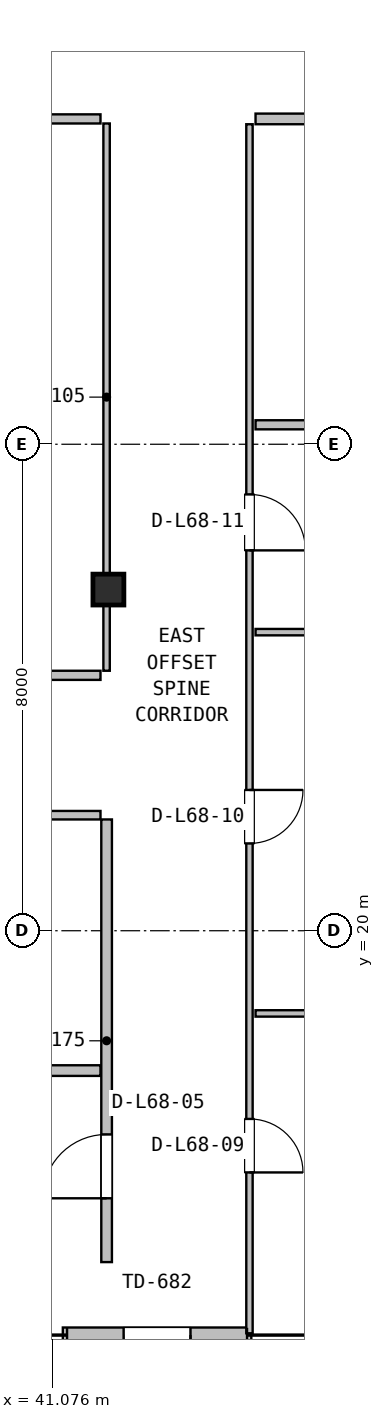
"""IFC4 building model, lengths in metres.
Left out: names, types, materials, properties, quantities, classifications, styles, units other than length and angle.
Written with IfcOpenShell. Run it as: python <this file> out.ifc"""

import sys

from ifc_helpers import new_model, si_unit, direction, frame, frame_2d, origin, origin_2d, place, context, subcontext, project, spatial, rectangle, hollow_circle, extrude, source, transform, mapped, element, fill, save


model = new_model("IFC4")
c1 = context("Model", 3, precision=1e-05, world=origin(), true_north=direction((0.0, 1.0)))
c2 = subcontext(c1, "Body", "Model", "MODEL_VIEW")
j1 = project(units=[si_unit("LENGTHUNIT", "METRE"), si_unit("PLANEANGLEUNIT", "RADIAN")], contexts=[c1])
p1 = place(None, origin())
s1 = spatial("IfcSite", under=j1, at=p1, CompositionType="ELEMENT")
p2 = place(p1, origin())
s2 = spatial("IfcBuilding", under=s1, at=p2, CompositionType="ELEMENT")
p3 = place(p2, frame((0.0, 0.0, 273.6)))
s3 = spatial("IfcBuildingStorey", under=s2, at=p3, CompositionType="ELEMENT", Elevation=273.6)
m1 = source(origin(), c2, "Body", "SweptSolid", [
    extrude(hollow_circle(Radius=0.254, WallThickness=0.02, at=origin_2d()), origin(), (0.0, 0.0, 1.0), 3.8),
])
p4 = place(p3, frame((42.0, 25.61, 0.0), z_axis=(0.0, 0.0, 1.0), x_axis=(1.0, 0.0, 0.0)))
e1 = element("IfcColumn", 1, at=p4, inside=s3, PredefinedType="COLUMN", context=c2, shape_type="MappedRepresentation", body=[
    mapped(m1, transform((0.0, 0.0, 0.0), x_axis=(1.0, 0.0, 0.0), y_axis=(0.0, 1.0, 0.0), z_axis=(0.0, 0.0, 1.0), scale=1.0)),
])
p5 = place(p3, frame((41.25, 13.35, 0.0), z_axis=(0.0, 0.0, 1.0), x_axis=(1.0, 0.0, 0.0)))
e2 = element("IfcWall", 2, at=p5, inside=s3, PredefinedType="SOLIDWALL", context=c2, shape_type="SweptSolid", body=[
    extrude(rectangle(XDim=3.1, YDim=0.25, at=frame_2d((1.55, 0.0))), origin(), (0.0, 0.0, 1.0), 3.53),
])
p6 = place(p5, frame((1.0, 0.0, 0.0)))
e3 = element("IfcOpeningElement", 3, at=p6, cuts=e2, PredefinedType="OPENING", context=c2, shape_type="SweptSolid", body=[
    extrude(rectangle(XDim=1.1, YDim=2.15, at=frame_2d((0.55, 1.075))), frame((0.0, 0.135, 0.0), z_axis=(0.0, -1.0, 0.0), x_axis=(1.0, 0.0, 0.0)), (0.0, 0.0, 1.0), 0.27),
])
p7 = place(p3, frame((41.97, 14.55, 0.0), z_axis=(0.0, 0.0, 1.0), x_axis=(0.0, 1.0, 0.0)))
e4 = element("IfcWall", 4, at=p7, inside=s3, PredefinedType="PARTITIONING", context=c2, shape_type="SweptSolid", body=[
    extrude(rectangle(XDim=7.28, YDim=0.175, at=frame_2d((3.64, 0.0))), origin(), (0.0, 0.0, 1.0), 2.981),
])
p8 = place(p7, frame((1.05, 0.0, 0.0)))
e5 = element("IfcOpeningElement", 5, at=p8, cuts=e4, PredefinedType="OPENING", context=c2, shape_type="SweptSolid", body=[
    extrude(rectangle(XDim=1.05, YDim=2.1, at=frame_2d((0.525, 1.05))), frame((0.0, 0.098, 0.0), z_axis=(0.0, -1.0, 0.0), x_axis=(1.0, 0.0, 0.0)), (0.0, 0.0, 1.0), 0.195),
])
p9 = place(p3, frame((12.18, 17.7, 0.0), z_axis=(0.0, 0.0, 1.0), x_axis=(1.0, 0.0, 0.0)))
e6 = element("IfcWall", 6, at=p9, inside=s3, PredefinedType="PARTITIONING", context=c2, shape_type="SweptSolid", body=[
    extrude(rectangle(XDim=29.69, YDim=0.175, at=frame_2d((14.845, 0.0))), origin(), (0.0, 0.0, 1.0), 2.981),
])
p10 = place(p3, frame((12.18, 21.9, 0.0), z_axis=(0.0, 0.0, 1.0), x_axis=(1.0, 0.0, 0.0)))
e7 = element("IfcWall", 7, at=p10, inside=s3, PredefinedType="PARTITIONING", context=c2, shape_type="SweptSolid", body=[
    extrude(rectangle(XDim=29.69, YDim=0.14, at=frame_2d((14.845, 0.0))), origin(), (0.0, 0.0, 1.0), 2.981),
])
p11 = place(p10, frame((16.08, 0.0, 0.0)))
e8 = element("IfcOpeningElement", 8, at=p11, cuts=e7, PredefinedType="OPENING", context=c2, shape_type="SweptSolid", body=[
    extrude(rectangle(XDim=1.0, YDim=2.1, at=frame_2d((0.5, 1.05))), frame((0.0, 0.08, 0.0), z_axis=(0.0, -1.0, 0.0), x_axis=(1.0, 0.0, 0.0)), (0.0, 0.0, 1.0), 0.16),
])
p12 = place(p3, frame((12.18, 24.2, 0.0), z_axis=(0.0, 0.0, 1.0), x_axis=(1.0, 0.0, 0.0)))
e9 = element("IfcWall", 9, at=p12, inside=s3, PredefinedType="PARTITIONING", context=c2, shape_type="SweptSolid", body=[
    extrude(rectangle(XDim=29.69, YDim=0.15, at=frame_2d((14.845, 0.0))), origin(), (0.0, 0.0, 1.0), 2.981),
])
p13 = place(p12, frame((7.96, 0.0, 0.0)))
e10 = element("IfcOpeningElement", 10, at=p13, cuts=e9, PredefinedType="OPENING", context=c2, shape_type="SweptSolid", body=[
    extrude(rectangle(XDim=0.88, YDim=2.06, at=frame_2d((0.44, 1.03))), frame((0.0, 0.085, 0.0), z_axis=(0.0, -1.0, 0.0), x_axis=(1.0, 0.0, 0.0)), (0.0, 0.0, 1.0), 0.17),
])
p14 = place(p12, frame((21.17, 0.0, 0.0)))
e11 = element("IfcOpeningElement", 11, at=p14, cuts=e9, PredefinedType="OPENING", context=c2, shape_type="SweptSolid", body=[
    extrude(rectangle(XDim=0.88, YDim=2.06, at=frame_2d((0.44, 1.03))), frame((0.0, 0.085, 0.0), z_axis=(0.0, -1.0, 0.0), x_axis=(1.0, 0.0, 0.0)), (0.0, 0.0, 1.0), 0.17),
])
p15 = place(p3, frame((12.18, 33.35, 0.0), z_axis=(0.0, 0.0, 1.0), x_axis=(1.0, 0.0, 0.0)))
e12 = element("IfcWall", 12, at=p15, inside=s3, PredefinedType="PARTITIONING", context=c2, shape_type="SweptSolid", body=[
    extrude(rectangle(XDim=29.69, YDim=0.15, at=frame_2d((14.845, 0.0))), origin(), (0.0, 0.0, 1.0), 2.981),
])
p16 = place(p3, frame((41.97, 24.275, 0.0), z_axis=(0.0, 0.0, 1.0), x_axis=(0.0, 1.0, 0.0)))
e13 = element("IfcWall", 13, at=p16, inside=s3, PredefinedType="PARTITIONING", context=c2, shape_type="SweptSolid", body=[
    extrude(rectangle(XDim=9.0, YDim=0.105, at=frame_2d((4.5, 0.0))), origin(), (0.0, 0.0, 1.0), 2.981),
])
p17 = place(p3, frame((44.42, 18.64, 0.0), z_axis=(0.0, 0.0, 1.0), x_axis=(1.0, 0.0, 0.0)))
e14 = element("IfcWall", 14, at=p17, inside=s3, PredefinedType="PARTITIONING", context=c2, shape_type="SweptSolid", body=[
    extrude(rectangle(XDim=11.4, YDim=0.105, at=frame_2d((5.7, 0.0))), origin(), (0.0, 0.0, 1.0), 3.171),
])
p18 = place(p3, frame((44.32, 13.38, 0.0), z_axis=(0.0, 0.0, 1.0), x_axis=(0.0, 1.0, 0.0)))
e15 = element("IfcWall", 15, at=p18, inside=s3, PredefinedType="PARTITIONING", context=c2, shape_type="SweptSolid", body=[
    extrude(rectangle(XDim=19.883, YDim=0.105, at=frame_2d((9.941, 0.0))), origin(), (0.0, 0.0, 1.0), 3.171),
])
p19 = place(p18, frame((2.645, 0.0, 0.0)))
e16 = element("IfcOpeningElement", 16, at=p19, cuts=e15, PredefinedType="OPENING", context=c2, shape_type="SweptSolid", body=[
    extrude(rectangle(XDim=0.88, YDim=2.06, at=frame_2d((0.44, 1.03))), frame((0.0, 0.062, 0.0), z_axis=(0.0, -1.0, 0.0), x_axis=(1.0, 0.0, 0.0)), (0.0, 0.0, 1.0), 0.125),
])
p20 = place(p18, frame((8.055, 0.0, 0.0)))
e17 = element("IfcOpeningElement", 17, at=p20, cuts=e15, PredefinedType="OPENING", context=c2, shape_type="SweptSolid", body=[
    extrude(rectangle(XDim=0.88, YDim=2.06, at=frame_2d((0.44, 1.03))), frame((0.0, 0.062, 0.0), z_axis=(0.0, -1.0, 0.0), x_axis=(1.0, 0.0, 0.0)), (0.0, 0.0, 1.0), 0.125),
])
p21 = place(p18, frame((12.875, 0.0, 0.0)))
e18 = element("IfcOpeningElement", 18, at=p21, cuts=e15, PredefinedType="OPENING", context=c2, shape_type="SweptSolid", body=[
    extrude(rectangle(XDim=0.92, YDim=2.08, at=frame_2d((0.46, 1.04))), frame((0.0, 0.062, 0.0), z_axis=(0.0, -1.0, 0.0), x_axis=(1.0, 0.0, 0.0)), (0.0, 0.0, 1.0), 0.125),
])
p22 = place(p3, frame((44.42, 24.91, 0.0), z_axis=(0.0, 0.0, 1.0), x_axis=(1.0, 0.0, 0.0)))
e19 = element("IfcWall", 19, at=p22, inside=s3, PredefinedType="PARTITIONING", context=c2, shape_type="SweptSolid", body=[
    extrude(rectangle(XDim=11.4, YDim=0.105, at=frame_2d((5.7, 0.0))), origin(), (0.0, 0.0, 1.0), 3.171),
])
p23 = place(p3, frame((44.42, 28.32, 0.0), z_axis=(0.0, 0.0, 1.0), x_axis=(1.0, 0.0, 0.0)))
e20 = element("IfcWall", 20, at=p23, inside=s3, PredefinedType="PARTITIONING", context=c2, shape_type="SweptSolid", body=[
    extrude(rectangle(XDim=11.4, YDim=0.15, at=frame_2d((5.7, 0.0))), origin(), (0.0, 0.0, 1.0), 3.171),
])
p24 = place(p3, frame((44.42, 33.35, 0.0), z_axis=(0.0, 0.0, 1.0), x_axis=(1.0, 0.0, 0.0)))
e21 = element("IfcWall", 21, at=p24, inside=s3, PredefinedType="PARTITIONING", context=c2, shape_type="SweptSolid", body=[
    extrude(rectangle(XDim=11.4, YDim=0.175, at=frame_2d((5.7, 0.0))), origin(), (0.0, 0.0, 1.0), 3.171),
])
p25 = place(p24, frame((3.44, 0.0, 0.0)))
e22 = element("IfcOpeningElement", 22, at=p25, cuts=e21, PredefinedType="OPENING", context=c2, shape_type="SweptSolid", body=[
    extrude(rectangle(XDim=1.05, YDim=2.1, at=frame_2d((0.525, 1.05))), frame((0.0, 0.098, 0.0), z_axis=(0.0, -1.0, 0.0), x_axis=(1.0, 0.0, 0.0)), (0.0, 0.0, 1.0), 0.195),
])
m2 = source(origin(), c2, "Body", "SweptSolid", [
    extrude(rectangle(XDim=1.1, YDim=2.15, at=frame_2d((0.55, 1.075))), frame((0.0, 0.025, 0.0), z_axis=(0.0, -1.0, 0.0), x_axis=(1.0, 0.0, 0.0)), (0.0, 0.0, 1.0), 0.05),
])
p26 = place(p6, frame((1.1, 0.0, 0.0), z_axis=(0.0, 0.0, 1.0), x_axis=(-1.0, 0.0, 0.0)))
e23 = element("IfcDoor", 23, at=p26, inside=s3, OperationType="SINGLE_SWING_RIGHT", PredefinedType="DOOR", context=c2, shape_type="MappedRepresentation", body=[
    mapped(m2, transform((0.0, 0.0, 0.0), x_axis=(1.0, 0.0, 0.0), y_axis=(0.0, 1.0, 0.0), z_axis=(0.0, 0.0, 1.0), scale=1.0)),
])
fill(e3, e23)
m3 = source(origin(), c2, "Body", "SweptSolid", [
    extrude(rectangle(XDim=1.05, YDim=2.1, at=frame_2d((0.525, 1.05))), frame((0.0, 0.025, 0.0), z_axis=(0.0, -1.0, 0.0), x_axis=(1.0, 0.0, 0.0)), (0.0, 0.0, 1.0), 0.05),
])
p27 = place(p8, origin())
e24 = element("IfcDoor", 24, at=p27, inside=s3, OperationType="SINGLE_SWING_LEFT", PredefinedType="DOOR", context=c2, shape_type="MappedRepresentation", body=[
    mapped(m3, transform((0.0, 0.0, 0.0), x_axis=(1.0, 0.0, 0.0), y_axis=(0.0, 1.0, 0.0), z_axis=(0.0, 0.0, 1.0), scale=1.0)),
])
fill(e5, e24)
m4 = source(origin(), c2, "Body", "SweptSolid", [
    extrude(rectangle(XDim=0.88, YDim=2.06, at=frame_2d((0.44, 1.03))), frame((0.0, 0.025, 0.0), z_axis=(0.0, -1.0, 0.0), x_axis=(1.0, 0.0, 0.0)), (0.0, 0.0, 1.0), 0.05),
])
p28 = place(p19, frame((0.88, 0.0, 0.0), z_axis=(0.0, 0.0, 1.0), x_axis=(-1.0, 0.0, 0.0)))
e25 = element("IfcDoor", 25, at=p28, inside=s3, OperationType="SINGLE_SWING_LEFT", PredefinedType="DOOR", context=c2, shape_type="MappedRepresentation", body=[
    mapped(m4, transform((0.0, 0.0, 0.0), x_axis=(1.0, 0.0, 0.0), y_axis=(0.0, 1.0, 0.0), z_axis=(0.0, 0.0, 1.0), scale=1.0)),
])
fill(e16, e25)
p29 = place(p20, frame((0.88, 0.0, 0.0), z_axis=(0.0, 0.0, 1.0), x_axis=(-1.0, 0.0, 0.0)))
e26 = element("IfcDoor", 26, at=p29, inside=s3, OperationType="SINGLE_SWING_RIGHT", PredefinedType="DOOR", context=c2, shape_type="MappedRepresentation", body=[
    mapped(m4, transform((0.0, 0.0, 0.0), x_axis=(1.0, 0.0, 0.0), y_axis=(0.0, 1.0, 0.0), z_axis=(0.0, 0.0, 1.0), scale=1.0)),
])
fill(e17, e26)
m5 = source(origin(), c2, "Body", "SweptSolid", [
    extrude(rectangle(XDim=0.92, YDim=2.08, at=frame_2d((0.46, 1.04))), frame((0.0, 0.025, 0.0), z_axis=(0.0, -1.0, 0.0), x_axis=(1.0, 0.0, 0.0)), (0.0, 0.0, 1.0), 0.05),
])
p30 = place(p21, frame((0.92, 0.0, 0.0), z_axis=(0.0, 0.0, 1.0), x_axis=(-1.0, 0.0, 0.0)))
e27 = element("IfcDoor", 27, at=p30, inside=s3, OperationType="SINGLE_SWING_LEFT", PredefinedType="DOOR", context=c2, shape_type="MappedRepresentation", body=[
    mapped(m5, transform((0.0, 0.0, 0.0), x_axis=(1.0, 0.0, 0.0), y_axis=(0.0, 1.0, 0.0), z_axis=(0.0, 0.0, 1.0), scale=1.0)),
])
fill(e18, e27)
save(model, sys.argv[1])
